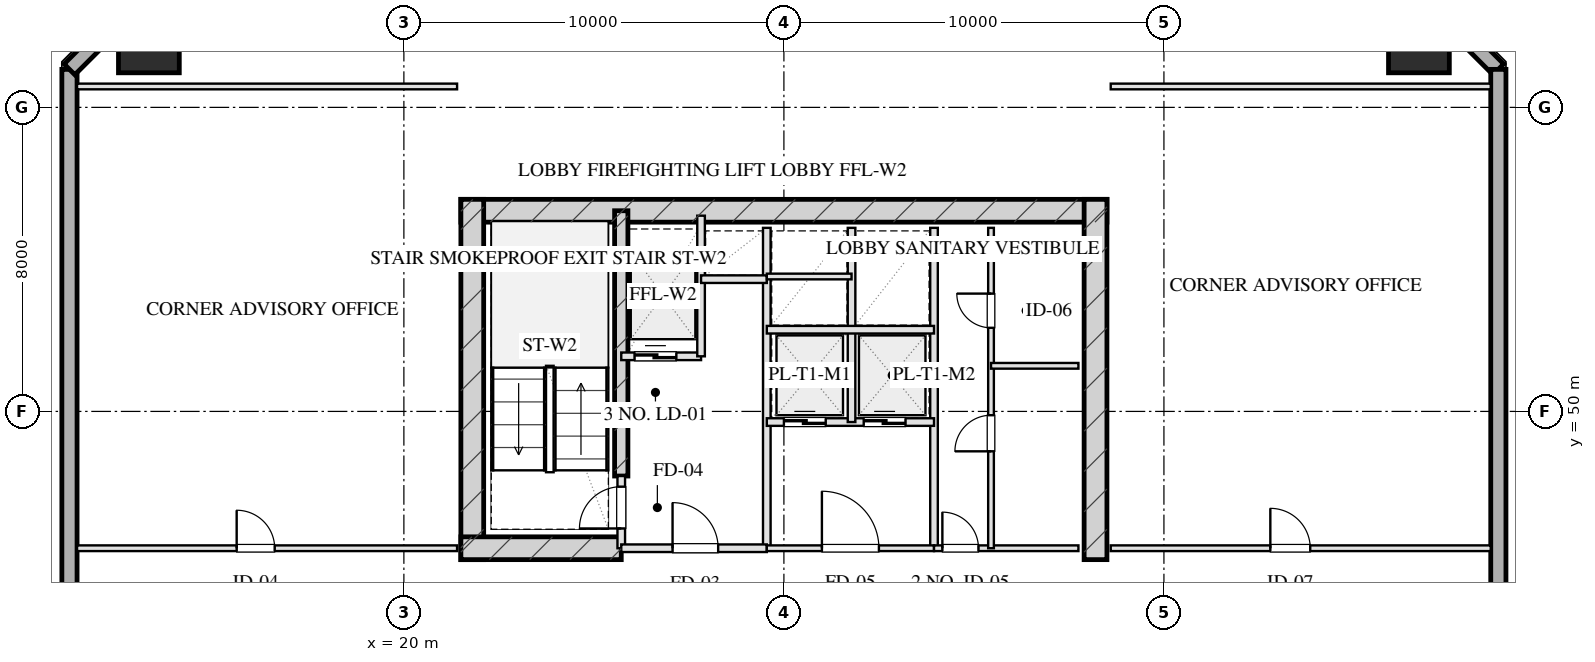
"""IFC4 building model, lengths in metres.
Left out: names, types, materials, properties, quantities, classifications, styles, units other than length and angle.
Written with IfcOpenShell. Run it as: python <this file> out.ifc"""

import sys

from ifc_helpers import new_model, si_unit, direction, frame, frame_2d, origin, origin_2d, place, context, subcontext, project, spatial, rectangle, hollow_rectangle, extrude, element, fill, save


model = new_model("IFC4")
c1 = context("Model", 3, precision=1e-05, world=origin(), true_north=direction((0.0, 1.0)))
c2 = subcontext(c1, "Body", "Model", "MODEL_VIEW")
j1 = project(units=[si_unit("LENGTHUNIT", "METRE"), si_unit("PLANEANGLEUNIT", "RADIAN")], contexts=[c1])
p1 = place(None, origin())
s1 = spatial("IfcSite", under=j1, at=p1, CompositionType="ELEMENT")
p2 = place(p1, origin())
s2 = spatial("IfcBuilding", under=s1, at=p2, CompositionType="ELEMENT")
p3 = place(p2, frame((0.0, 0.0, 113.85)))
s3 = spatial("IfcBuildingStorey", under=s2, at=p3, CompositionType="ELEMENT", Elevation=113.85)
p4 = place(p3, frame((21.5, 55.28, 0.0), z_axis=(0.0, 0.0, 1.0), x_axis=(1.0, 0.0, 0.0)))
e1 = element("IfcWall", 1, at=p4, inside=s3, PredefinedType="SHEAR", context=c2, shape_type="SweptSolid", body=[
    extrude(rectangle(XDim=17.0, YDim=0.6, at=frame_2d((8.5, 0.0))), origin(), (0.0, 0.0, 1.0), 3.45),
])
for number, where, z_axis, x_axis in (
    (2, (21.8, 46.1, 0.0), (0.0, 0.0, 1.0), (0.0, 1.0, 0.0)),
    (3, (38.2, 46.1, 0.0), (0.0, 0.0, 1.0), (0.0, 1.0, 0.0)),
):
    element("IfcWall", number, at=place(p3, frame(where, z_axis=z_axis, x_axis=x_axis)), inside=s3, PredefinedType="SHEAR", context=c2, shape_type="SweptSolid", body=[
        extrude(rectangle(XDim=9.48, YDim=0.6, at=frame_2d((4.74, 0.0))), origin(), (0.0, 0.0, 1.0), 3.45),
    ])
p5 = place(p3, frame((25.72, 48.3, 0.0), z_axis=(0.0, 0.0, 1.0), x_axis=(0.0, 1.0, 0.0)))
e4 = element("IfcWall", 4, at=p5, inside=s3, PredefinedType="SHEAR", context=c2, shape_type="SweptSolid", body=[
    extrude(rectangle(XDim=6.98, YDim=0.35, at=frame_2d((3.49, 0.0))), origin(), (0.0, 0.0, 1.0), 3.45),
])
p6 = place(p3, frame((21.5, 46.4, 0.0), z_axis=(0.0, 0.0, 1.0), x_axis=(1.0, 0.0, 0.0)))
e5 = element("IfcWall", 5, at=p6, inside=s3, PredefinedType="SHEAR", context=c2, shape_type="SweptSolid", body=[
    extrude(rectangle(XDim=4.22, YDim=0.6, at=frame_2d((2.11, 0.0))), origin(), (0.0, 0.0, 1.0), 3.45),
])
for number, where, z_axis, x_axis in (
    (6, (46.71, 59.71, 0.0), (0.0, 0.0, 1.0), (1.0, 0.0, 0.0)),
    (7, (13.29, 59.71, 0.0), (0.0, 0.0, 1.0), (1.0, 0.0, 0.0)),
):
    element("IfcColumn", number, at=place(p3, frame(where, z_axis=z_axis, x_axis=x_axis)), inside=s3, PredefinedType="COLUMN", context=c2, shape_type="SweptSolid", body=[
        extrude(hollow_rectangle(XDim=1.6, YDim=1.6, WallThickness=0.055, at=origin_2d()), origin(), (0.0, 0.0, 1.0), 3.451),
    ])
p7 = place(p3, frame((11.2, 9.0, 0.0), z_axis=(0.0, 0.0, 1.0), x_axis=(0.0, 1.0, 0.0)))
e8 = element("IfcWall", 8, at=p7, inside=s3, PredefinedType="SOLIDWALL", context=c2, shape_type="SweptSolid", body=[
    extrude(rectangle(XDim=50.0, YDim=0.4, at=frame_2d((25.0, 0.0))), origin(), (0.0, 0.0, 1.0), 2.61),
])
p8 = place(p7, frame((27.336, 0.0, 0.0)))
e9 = element("IfcOpeningElement", 9, at=p8, cuts=e8, PredefinedType="OPENING", context=c2, shape_type="SweptSolid", body=[
    extrude(rectangle(XDim=1.1, YDim=2.15, at=frame_2d((0.55, 1.075))), frame((0.0, 0.21, 0.0), z_axis=(0.0, -1.0, 0.0), x_axis=(1.0, 0.0, 0.0)), (0.0, 0.0, 1.0), 0.42),
])
for number, where, z_axis, x_axis in (
    (10, (11.2, 59.0, 0.0), (0.0, 0.0, 1.0), (0.707, 0.707, 0.0)),
    (11, (46.0, 61.8, 0.0), (0.0, 0.0, 1.0), (0.707, -0.707, 0.0)),
):
    element("IfcWall", number, at=place(p3, frame(where, z_axis=z_axis, x_axis=x_axis)), inside=s3, PredefinedType="SOLIDWALL", context=c2, shape_type="SweptSolid", body=[
        extrude(rectangle(XDim=3.96, YDim=0.4, at=frame_2d((1.98, 0.0))), origin(), (0.0, 0.0, 1.0), 2.61),
    ])
p9 = place(p3, frame((48.8, 59.0, 0.0), z_axis=(0.0, 0.0, 1.0), x_axis=(0.0, -1.0, 0.0)))
e12 = element("IfcWall", 12, at=p9, inside=s3, PredefinedType="SOLIDWALL", context=c2, shape_type="SweptSolid", body=[
    extrude(rectangle(XDim=50.0, YDim=0.4, at=frame_2d((25.0, 0.0))), origin(), (0.0, 0.0, 1.0), 2.61),
])
p10 = place(p9, frame((30.2, 0.0, 0.75)))
e13 = element("IfcOpeningElement", 13, at=p10, cuts=e12, PredefinedType="OPENING", context=c2, shape_type="SweptSolid", body=[
    extrude(rectangle(XDim=2.4, YDim=1.46, at=frame_2d((1.2, 0.73))), frame((0.0, 0.21, 0.0), z_axis=(0.0, -1.0, 0.0), x_axis=(1.0, 0.0, 0.0)), (0.0, 0.0, 1.0), 0.42),
])
p11 = place(p9, frame((18.65, 0.0, 0.0)))
e14 = element("IfcOpeningElement", 14, at=p11, cuts=e12, PredefinedType="OPENING", context=c2, shape_type="SweptSolid", body=[
    extrude(rectangle(XDim=1.1, YDim=2.15, at=frame_2d((0.55, 1.075))), frame((0.0, 0.21, 0.0), z_axis=(0.0, -1.0, 0.0), x_axis=(1.0, 0.0, 0.0)), (0.0, 0.0, 1.0), 0.42),
])
p12 = place(p3, frame((25.72, 46.4, 0.0), z_axis=(0.0, 0.0, 1.0), x_axis=(0.0, 1.0, 0.0)))
e15 = element("IfcWall", 15, at=p12, inside=s3, PredefinedType="PARTITIONING", context=c2, shape_type="SweptSolid", body=[
    extrude(rectangle(XDim=1.9, YDim=0.2, at=frame_2d((0.95, 0.0))), origin(), (0.0, 0.0, 1.0), 3.175),
])
p13 = place(p12, frame((0.52, 0.0, 0.0)))
e16 = element("IfcOpeningElement", 16, at=p13, cuts=e15, PredefinedType="OPENING", context=c2, shape_type="SweptSolid", body=[
    extrude(rectangle(XDim=1.1, YDim=2.05, at=frame_2d((0.55, 1.025))), frame((0.0, 0.11, 0.0), z_axis=(0.0, -1.0, 0.0), x_axis=(1.0, 0.0, 0.0)), (0.0, 0.0, 1.0), 0.22),
])
p14 = place(p3, frame((29.55, 46.4, 0.0), z_axis=(0.0, 0.0, 1.0), x_axis=(0.0, 1.0, 0.0)))
e17 = element("IfcWall", 17, at=p14, inside=s3, PredefinedType="PARTITIONING", context=c2, shape_type="SweptSolid", body=[
    extrude(rectangle(XDim=8.43, YDim=0.2, at=frame_2d((4.215, 0.0))), origin(), (0.0, 0.0, 1.0), 3.175),
])
p15 = place(p3, frame((25.72, 46.4, 0.0), z_axis=(0.0, 0.0, 1.0), x_axis=(1.0, 0.0, 0.0)))
e18 = element("IfcWall", 18, at=p15, inside=s3, PredefinedType="PARTITIONING", context=c2, shape_type="SweptSolid", body=[
    extrude(rectangle(XDim=3.83, YDim=0.2, at=frame_2d((1.915, 0.0))), origin(), (0.0, 0.0, 1.0), 3.175),
])
p16 = place(p15, frame((1.35, 0.0, 0.0)))
e19 = element("IfcOpeningElement", 19, at=p16, cuts=e18, PredefinedType="OPENING", context=c2, shape_type="SweptSolid", body=[
    extrude(rectangle(XDim=1.2, YDim=2.05, at=frame_2d((0.6, 1.025))), frame((0.0, 0.11, 0.0), z_axis=(0.0, -1.0, 0.0), x_axis=(1.0, 0.0, 0.0)), (0.0, 0.0, 1.0), 0.22),
])
p17 = place(p3, frame((25.72, 51.45, 0.0), z_axis=(0.0, 0.0, 1.0), x_axis=(1.0, 0.0, 0.0)))
e20 = element("IfcWall", 20, at=p17, inside=s3, PredefinedType="PARTITIONING", context=c2, shape_type="SweptSolid", body=[
    extrude(rectangle(XDim=2.1, YDim=0.2, at=frame_2d((1.05, 0.0))), origin(), (0.0, 0.0, 1.0), 3.175),
])
p18 = place(p17, frame((0.35, 0.0, 0.0)))
e21 = element("IfcOpeningElement", 21, at=p18, cuts=e20, PredefinedType="OPENING", context=c2, shape_type="SweptSolid", body=[
    extrude(rectangle(XDim=1.1, YDim=2.05, at=frame_2d((0.55, 1.025))), frame((0.0, 0.11, 0.0), z_axis=(0.0, -1.0, 0.0), x_axis=(1.0, 0.0, 0.0)), (0.0, 0.0, 1.0), 0.22),
])
p19 = place(p3, frame((27.82, 51.45, 0.0), z_axis=(0.0, 0.0, 1.0), x_axis=(0.0, 1.0, 0.0)))
e22 = element("IfcWall", 22, at=p19, inside=s3, PredefinedType="PARTITIONING", context=c2, shape_type="SweptSolid", body=[
    extrude(rectangle(XDim=3.7, YDim=0.2, at=frame_2d((1.85, 0.0))), origin(), (0.0, 0.0, 1.0), 3.175),
])
p20 = place(p3, frame((27.82, 53.48, 0.0), z_axis=(0.0, 0.0, 1.0), x_axis=(1.0, 0.0, 0.0)))
e23 = element("IfcWall", 23, at=p20, inside=s3, PredefinedType="PARTITIONING", context=c2, shape_type="SweptSolid", body=[
    extrude(rectangle(XDim=1.73, YDim=0.2, at=frame_2d((0.865, 0.0))), origin(), (0.0, 0.0, 1.0), 3.175),
])
p21 = place(p3, frame((33.95, 46.4, 0.0), z_axis=(0.0, 0.0, 1.0), x_axis=(0.0, 1.0, 0.0)))
e24 = element("IfcWall", 24, at=p21, inside=s3, PredefinedType="PARTITIONING", context=c2, shape_type="SweptSolid", body=[
    extrude(rectangle(XDim=8.43, YDim=0.2, at=frame_2d((4.215, 0.0))), origin(), (0.0, 0.0, 1.0), 3.175),
])
p22 = place(p3, frame((29.55, 46.4, 0.0), z_axis=(0.0, 0.0, 1.0), x_axis=(1.0, 0.0, 0.0)))
e25 = element("IfcWall", 25, at=p22, inside=s3, PredefinedType="PARTITIONING", context=c2, shape_type="SweptSolid", body=[
    extrude(rectangle(XDim=4.4, YDim=0.15, at=frame_2d((2.2, 0.0))), origin(), (0.0, 0.0, 1.0), 3.175),
])
p23 = place(p22, frame((1.45, 0.0, 0.0)))
e26 = element("IfcOpeningElement", 26, at=p23, cuts=e25, PredefinedType="OPENING", context=c2, shape_type="SweptSolid", body=[
    extrude(rectangle(XDim=1.5, YDim=2.05, at=frame_2d((0.75, 1.025))), frame((0.0, 0.085, 0.0), z_axis=(0.0, -1.0, 0.0), x_axis=(1.0, 0.0, 0.0)), (0.0, 0.0, 1.0), 0.17),
])
p24 = place(p3, frame((29.55, 49.72, 0.0), z_axis=(0.0, 0.0, 1.0), x_axis=(1.0, 0.0, 0.0)))
e27 = element("IfcWall", 27, at=p24, inside=s3, PredefinedType="PARTITIONING", context=c2, shape_type="SweptSolid", body=[
    extrude(rectangle(XDim=4.4, YDim=0.2, at=frame_2d((2.2, 0.0))), origin(), (0.0, 0.0, 1.0), 3.175),
])
p25 = place(p24, frame((0.45, 0.0, 0.0)))
e28 = element("IfcOpeningElement", 28, at=p25, cuts=e27, PredefinedType="OPENING", context=c2, shape_type="SweptSolid", body=[
    extrude(rectangle(XDim=1.1, YDim=2.05, at=frame_2d((0.55, 1.025))), frame((0.0, 0.11, 0.0), z_axis=(0.0, -1.0, 0.0), x_axis=(1.0, 0.0, 0.0)), (0.0, 0.0, 1.0), 0.22),
])
p26 = place(p24, frame((2.55, 0.0, 0.0)))
e29 = element("IfcOpeningElement", 29, at=p26, cuts=e27, PredefinedType="OPENING", context=c2, shape_type="SweptSolid", body=[
    extrude(rectangle(XDim=1.1, YDim=2.05, at=frame_2d((0.55, 1.025))), frame((0.0, 0.11, 0.0), z_axis=(0.0, -1.0, 0.0), x_axis=(1.0, 0.0, 0.0)), (0.0, 0.0, 1.0), 0.22),
])
p27 = place(p3, frame((31.78, 49.72, 0.0), z_axis=(0.0, 0.0, 1.0), x_axis=(0.0, 1.0, 0.0)))
e30 = element("IfcWall", 30, at=p27, inside=s3, PredefinedType="PARTITIONING", context=c2, shape_type="SweptSolid", body=[
    extrude(rectangle(XDim=5.11, YDim=0.2, at=frame_2d((2.555, 0.0))), origin(), (0.0, 0.0, 1.0), 3.175),
])
p28 = place(p3, frame((29.55, 52.15, 0.0), z_axis=(0.0, 0.0, 1.0), x_axis=(1.0, 0.0, 0.0)))
e31 = element("IfcWall", 31, at=p28, inside=s3, PredefinedType="PARTITIONING", context=c2, shape_type="SweptSolid", body=[
    extrude(rectangle(XDim=4.4, YDim=0.2, at=frame_2d((2.2, 0.0))), origin(), (0.0, 0.0, 1.0), 3.175),
])
p29 = place(p3, frame((29.55, 53.55, 0.0), z_axis=(0.0, 0.0, 1.0), x_axis=(1.0, 0.0, 0.0)))
e32 = element("IfcWall", 32, at=p29, inside=s3, PredefinedType="PARTITIONING", context=c2, shape_type="SweptSolid", body=[
    extrude(rectangle(XDim=2.23, YDim=0.15, at=frame_2d((1.115, 0.0))), origin(), (0.0, 0.0, 1.0), 3.175),
])
p30 = place(p3, frame((33.95, 46.4, 0.0), z_axis=(0.0, 0.0, 1.0), x_axis=(1.0, 0.0, 0.0)))
e33 = element("IfcWall", 33, at=p30, inside=s3, PredefinedType="PARTITIONING", context=c2, shape_type="SweptSolid", body=[
    extrude(rectangle(XDim=3.8, YDim=0.15, at=frame_2d((1.9, 0.0))), origin(), (0.0, 0.0, 1.0), 3.175),
])
p31 = place(p30, frame((0.22, 0.0, 0.0)))
e34 = element("IfcOpeningElement", 34, at=p31, cuts=e33, PredefinedType="OPENING", context=c2, shape_type="SweptSolid", body=[
    extrude(rectangle(XDim=0.95, YDim=2.05, at=frame_2d((0.475, 1.025))), frame((0.0, 0.085, 0.0), z_axis=(0.0, -1.0, 0.0), x_axis=(1.0, 0.0, 0.0)), (0.0, 0.0, 1.0), 0.17),
])
p32 = place(p3, frame((35.45, 46.4, 0.0), z_axis=(0.0, 0.0, 1.0), x_axis=(0.0, 1.0, 0.0)))
e35 = element("IfcWall", 35, at=p32, inside=s3, PredefinedType="PARTITIONING", context=c2, shape_type="SweptSolid", body=[
    extrude(rectangle(XDim=8.43, YDim=0.15, at=frame_2d((4.215, 0.0))), origin(), (0.0, 0.0, 1.0), 2.815),
])
p33 = place(p32, frame((2.55, 0.0, 0.0)))
e36 = element("IfcOpeningElement", 36, at=p33, cuts=e35, PredefinedType="OPENING", context=c2, shape_type="SweptSolid", body=[
    extrude(rectangle(XDim=0.95, YDim=2.05, at=frame_2d((0.475, 1.025))), frame((0.0, 0.085, 0.0), z_axis=(0.0, -1.0, 0.0), x_axis=(1.0, 0.0, 0.0)), (0.0, 0.0, 1.0), 0.17),
])
p34 = place(p32, frame((5.8, 0.0, 0.0)))
e37 = element("IfcOpeningElement", 37, at=p34, cuts=e35, PredefinedType="OPENING", context=c2, shape_type="SweptSolid", body=[
    extrude(rectangle(XDim=0.9, YDim=2.05, at=frame_2d((0.45, 1.025))), frame((0.0, 0.085, 0.0), z_axis=(0.0, -1.0, 0.0), x_axis=(1.0, 0.0, 0.0)), (0.0, 0.0, 1.0), 0.17),
])
p35 = place(p3, frame((35.45, 51.2, 0.0), z_axis=(0.0, 0.0, 1.0), x_axis=(1.0, 0.0, 0.0)))
e38 = element("IfcWall", 38, at=p35, inside=s3, PredefinedType="PARTITIONING", context=c2, shape_type="SweptSolid", body=[
    extrude(rectangle(XDim=2.3, YDim=0.15, at=frame_2d((1.15, 0.0))), origin(), (0.0, 0.0, 1.0), 3.175),
])
p36 = place(p3, frame((11.4, 58.55, 0.0), z_axis=(0.0, 0.0, 1.0), x_axis=(1.0, 0.0, 0.0)))
e39 = element("IfcWall", 39, at=p36, inside=s3, PredefinedType="PARTITIONING", context=c2, shape_type="SweptSolid", body=[
    extrude(rectangle(XDim=10.0, YDim=0.15, at=frame_2d((5.0, 0.0))), origin(), (0.0, 0.0, 1.0), 3.175),
])
p37 = place(p3, frame((11.4, 46.4, 0.0), z_axis=(0.0, 0.0, 1.0), x_axis=(1.0, 0.0, 0.0)))
e40 = element("IfcWall", 40, at=p37, inside=s3, PredefinedType="PARTITIONING", context=c2, shape_type="SweptSolid", body=[
    extrude(rectangle(XDim=10.0, YDim=0.15, at=frame_2d((5.0, 0.0))), origin(), (0.0, 0.0, 1.0), 3.175),
])
p38 = place(p37, frame((4.2, 0.0, 0.0)))
e41 = element("IfcOpeningElement", 41, at=p38, cuts=e40, PredefinedType="OPENING", context=c2, shape_type="SweptSolid", body=[
    extrude(rectangle(XDim=1.0, YDim=2.05, at=frame_2d((0.5, 1.025))), frame((0.0, 0.085, 0.0), z_axis=(0.0, -1.0, 0.0), x_axis=(1.0, 0.0, 0.0)), (0.0, 0.0, 1.0), 0.17),
])
p39 = place(p3, frame((38.6, 58.55, 0.0), z_axis=(0.0, 0.0, 1.0), x_axis=(1.0, 0.0, 0.0)))
e42 = element("IfcWall", 42, at=p39, inside=s3, PredefinedType="PARTITIONING", context=c2, shape_type="SweptSolid", body=[
    extrude(rectangle(XDim=10.0, YDim=0.15, at=frame_2d((5.0, 0.0))), origin(), (0.0, 0.0, 1.0), 3.175),
])
p40 = place(p3, frame((38.6, 46.4, 0.0), z_axis=(0.0, 0.0, 1.0), x_axis=(1.0, 0.0, 0.0)))
e43 = element("IfcWall", 43, at=p40, inside=s3, PredefinedType="PARTITIONING", context=c2, shape_type="SweptSolid", body=[
    extrude(rectangle(XDim=10.0, YDim=0.15, at=frame_2d((5.0, 0.0))), origin(), (0.0, 0.0, 1.0), 3.175),
])
p41 = place(p40, frame((4.2, 0.0, 0.0)))
e44 = element("IfcOpeningElement", 44, at=p41, cuts=e43, PredefinedType="OPENING", context=c2, shape_type="SweptSolid", body=[
    extrude(rectangle(XDim=1.05, YDim=2.05, at=frame_2d((0.525, 1.025))), frame((0.0, 0.085, 0.0), z_axis=(0.0, -1.0, 0.0), x_axis=(1.0, 0.0, 0.0)), (0.0, 0.0, 1.0), 0.17),
])
p42 = place(p13, origin())
e45 = element("IfcDoor", 45, at=p42, inside=s3, OperationType="SINGLE_SWING_LEFT", PredefinedType="DOOR", context=c2, shape_type="SweptSolid", body=[
    extrude(rectangle(XDim=1.1, YDim=2.05, at=frame_2d((0.55, 1.025))), frame((0.0, 0.025, 0.0), z_axis=(0.0, -1.0, 0.0), x_axis=(1.0, 0.0, 0.0)), (0.0, 0.0, 1.0), 0.05),
])
fill(e16, e45)
p43 = place(p16, origin())
e46 = element("IfcDoor", 46, at=p43, inside=s3, OperationType="SINGLE_SWING_LEFT", PredefinedType="DOOR", context=c2, shape_type="SweptSolid", body=[
    extrude(rectangle(XDim=1.2, YDim=2.05, at=frame_2d((0.6, 1.025))), frame((0.0, 0.025, 0.0), z_axis=(0.0, -1.0, 0.0), x_axis=(1.0, 0.0, 0.0)), (0.0, 0.0, 1.0), 0.05),
])
fill(e19, e46)
p44 = place(p18, origin())
e47 = element("IfcDoor", 47, at=p44, inside=s3, OperationType="DOUBLE_DOOR_SLIDING", PredefinedType="DOOR", context=c2, shape_type="SweptSolid", body=[
    extrude(rectangle(XDim=1.1, YDim=2.05, at=frame_2d((0.55, 1.025))), frame((0.0, 0.025, 0.0), z_axis=(0.0, -1.0, 0.0), x_axis=(1.0, 0.0, 0.0)), (0.0, 0.0, 1.0), 0.05),
])
fill(e21, e47)
p45 = place(p23, origin())
e48 = element("IfcDoor", 48, at=p45, inside=s3, OperationType="SINGLE_SWING_LEFT", PredefinedType="DOOR", context=c2, shape_type="SweptSolid", body=[
    extrude(rectangle(XDim=1.5, YDim=2.05, at=frame_2d((0.75, 1.025))), frame((0.0, 0.025, 0.0), z_axis=(0.0, -1.0, 0.0), x_axis=(1.0, 0.0, 0.0)), (0.0, 0.0, 1.0), 0.05),
])
fill(e26, e48)
p46 = place(p25, origin())
e49 = element("IfcDoor", 49, at=p46, inside=s3, OperationType="DOUBLE_DOOR_SLIDING", PredefinedType="DOOR", context=c2, shape_type="SweptSolid", body=[
    extrude(rectangle(XDim=1.1, YDim=2.05, at=frame_2d((0.55, 1.025))), frame((0.0, 0.025, 0.0), z_axis=(0.0, -1.0, 0.0), x_axis=(1.0, 0.0, 0.0)), (0.0, 0.0, 1.0), 0.05),
])
fill(e28, e49)
p47 = place(p26, origin())
e50 = element("IfcDoor", 50, at=p47, inside=s3, OperationType="DOUBLE_DOOR_SLIDING", PredefinedType="DOOR", context=c2, shape_type="SweptSolid", body=[
    extrude(rectangle(XDim=1.1, YDim=2.05, at=frame_2d((0.55, 1.025))), frame((0.0, 0.025, 0.0), z_axis=(0.0, -1.0, 0.0), x_axis=(1.0, 0.0, 0.0)), (0.0, 0.0, 1.0), 0.05),
])
fill(e29, e50)
p48 = place(p31, origin())
e51 = element("IfcDoor", 51, at=p48, inside=s3, OperationType="SINGLE_SWING_LEFT", PredefinedType="DOOR", context=c2, shape_type="SweptSolid", body=[
    extrude(rectangle(XDim=0.95, YDim=2.05, at=frame_2d((0.475, 1.025))), frame((0.0, 0.025, 0.0), z_axis=(0.0, -1.0, 0.0), x_axis=(1.0, 0.0, 0.0)), (0.0, 0.0, 1.0), 0.05),
])
fill(e34, e51)
p49 = place(p33, origin())
e52 = element("IfcDoor", 52, at=p49, inside=s3, OperationType="SINGLE_SWING_LEFT", PredefinedType="DOOR", context=c2, shape_type="SweptSolid", body=[
    extrude(rectangle(XDim=0.95, YDim=2.05, at=frame_2d((0.475, 1.025))), frame((0.0, 0.025, 0.0), z_axis=(0.0, -1.0, 0.0), x_axis=(1.0, 0.0, 0.0)), (0.0, 0.0, 1.0), 0.05),
])
fill(e36, e52)
p50 = place(p34, origin())
e53 = element("IfcDoor", 53, at=p50, inside=s3, OperationType="SINGLE_SWING_RIGHT", PredefinedType="DOOR", context=c2, shape_type="SweptSolid", body=[
    extrude(rectangle(XDim=0.9, YDim=2.05, at=frame_2d((0.45, 1.025))), frame((0.0, 0.025, 0.0), z_axis=(0.0, -1.0, 0.0), x_axis=(1.0, 0.0, 0.0)), (0.0, 0.0, 1.0), 0.05),
])
fill(e37, e53)
p51 = place(p38, origin())
e54 = element("IfcDoor", 54, at=p51, inside=s3, OperationType="SINGLE_SWING_LEFT", PredefinedType="DOOR", context=c2, shape_type="SweptSolid", body=[
    extrude(rectangle(XDim=1.0, YDim=2.05, at=frame_2d((0.5, 1.025))), frame((0.0, 0.025, 0.0), z_axis=(0.0, -1.0, 0.0), x_axis=(1.0, 0.0, 0.0)), (0.0, 0.0, 1.0), 0.05),
])
fill(e41, e54)
p52 = place(p41, origin())
e55 = element("IfcDoor", 55, at=p52, inside=s3, OperationType="SINGLE_SWING_LEFT", PredefinedType="DOOR", context=c2, shape_type="SweptSolid", body=[
    extrude(rectangle(XDim=1.05, YDim=2.05, at=frame_2d((0.525, 1.025))), frame((0.0, 0.025, 0.0), z_axis=(0.0, -1.0, 0.0), x_axis=(1.0, 0.0, 0.0)), (0.0, 0.0, 1.0), 0.05),
])
fill(e44, e55)
save(model, sys.argv[1])
